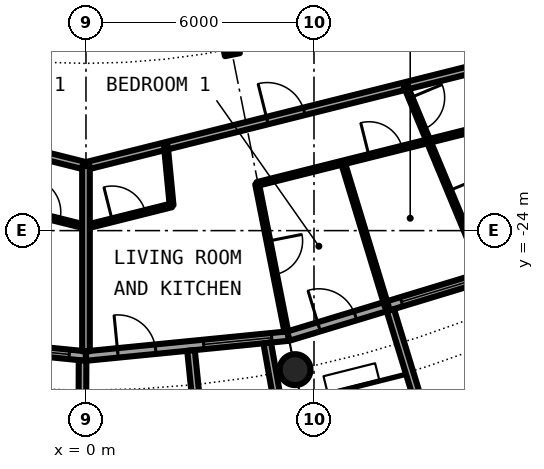
"""IFC4 building model, lengths in metres.
Left out: names, types, materials, properties, quantities, classifications, styles, units other than length and angle.
Written with IfcOpenShell. Run it as: python <this file> out.ifc"""

import sys

from ifc_helpers import new_model, si_unit, direction, frame, frame_2d, origin, origin_2d, place, context, subcontext, project, spatial, rectangle, circle, hollow_circle, i_section, extrude, element, fill, save


model = new_model("IFC4")
c1 = context("Model", 3, precision=1e-05, world=origin(), true_north=direction((0.0, 1.0)))
c2 = subcontext(c1, "Body", "Model", "MODEL_VIEW")
j1 = project(units=[si_unit("LENGTHUNIT", "METRE"), si_unit("PLANEANGLEUNIT", "RADIAN")], contexts=[c1])
p1 = place(None, origin())
s1 = spatial("IfcSite", under=j1, at=p1, CompositionType="ELEMENT")
p2 = place(p1, origin())
s2 = spatial("IfcBuilding", under=s1, at=p2, CompositionType="ELEMENT")
p3 = place(p2, frame((0.0, 0.0, 190.2)))
s3 = spatial("IfcBuildingStorey", under=s2, at=p3, CompositionType="ELEMENT", Elevation=190.2)
p4 = place(p3, frame((5.501, -27.658, 0.0), z_axis=(0.0, 0.0, 1.0), x_axis=(1.0, 0.0, 0.0)))
e1 = element("IfcColumn", 1, at=p4, inside=s3, PredefinedType="COLUMN", context=c2, shape_type="SweptSolid", body=[
    extrude(hollow_circle(Radius=0.406, WallThickness=0.03, at=origin_2d()), origin(), (0.0, 0.0, 1.0), 3.05),
])
p5 = place(p3, frame((3.824, -19.223, 0.0), z_axis=(0.0, 0.0, 1.0), x_axis=(0.195090322016, -0.980785280403, 0.0)))
e2 = element("IfcColumn", 2, at=p5, inside=s3, PredefinedType="COLUMN", context=c2, shape_type="SweptSolid", body=[
    extrude(i_section(OverallWidth=0.3, OverallDepth=0.4, WebThickness=0.013, FlangeThickness=0.024, FilletRadius=0.027, at=origin_2d()), origin(), (0.0, 0.0, 1.0), 3.05),
])
p6 = place(p3, frame((-5.326, -26.775, 0.0), z_axis=(0.0, 0.0, 1.0), x_axis=(0.995173996315, -0.098126026407, 0.0)))
e3 = element("IfcWall", 3, at=p6, inside=s3, PredefinedType="SOLIDWALL", context=c2, shape_type="SweptSolid", body=[
    extrude(rectangle(XDim=5.352, YDim=0.25, at=frame_2d((2.676, 0.0))), origin(), (0.0, 0.0, 1.0), 2.7),
])
p7 = place(p6, frame((0.841, 0.0, 0.0)))
e4 = element("IfcOpeningElement", 4, at=p7, cuts=e3, PredefinedType="OPENING", context=c2, shape_type="SweptSolid", body=[
    extrude(rectangle(XDim=1.0, YDim=2.2, at=frame_2d((0.5, 1.1))), frame((0.0, 0.135, 0.0), z_axis=(0.0, -1.0, 0.0), x_axis=(1.0, 0.0, 0.0)), (0.0, 0.0, 1.0), 0.27),
])
p8 = place(p6, frame((3.111, 0.0, 0.3)))
e5 = element("IfcOpeningElement", 5, at=p8, cuts=e3, PredefinedType="OPENING", context=c2, shape_type="SweptSolid", body=[
    extrude(rectangle(XDim=1.8, YDim=2.1, at=frame_2d((0.9, 1.05))), frame((0.0, 0.135, 0.0), z_axis=(0.0, -1.0, 0.0), x_axis=(1.0, 0.0, 0.0)), (0.0, 0.0, 1.0), 0.27),
])
p9 = place(p3, frame((-0.09, -27.417, -0.03), z_axis=(0.0, 0.0, 1.0), x_axis=(-0.00347308367, -0.999993968827, 0.0)))
e6 = element("IfcWall", 6, at=p9, inside=s3, PredefinedType="SOLIDWALL", context=c2, shape_type="SweptSolid", body=[
    extrude(rectangle(XDim=2.882, YDim=0.2, at=frame_2d((1.441, 0.0))), origin(), (0.0, 0.0, 1.0), 2.73),
])
p10 = place(p3, frame((0.0, -27.3, 0.0), z_axis=(0.0, 0.0, 1.0), x_axis=(0.995173996315, 0.098126026407, 0.0)))
e7 = element("IfcWall", 7, at=p10, inside=s3, PredefinedType="SOLIDWALL", context=c2, shape_type="SweptSolid", body=[
    extrude(rectangle(XDim=5.352, YDim=0.25, at=frame_2d((2.676, 0.0))), origin(), (0.0, 0.0, 1.0), 2.7),
])
p11 = place(p10, frame((0.841, 0.0, 0.0)))
e8 = element("IfcOpeningElement", 8, at=p11, cuts=e7, PredefinedType="OPENING", context=c2, shape_type="SweptSolid", body=[
    extrude(rectangle(XDim=1.0, YDim=2.2, at=frame_2d((0.5, 1.1))), frame((0.0, 0.135, 0.0), z_axis=(0.0, -1.0, 0.0), x_axis=(1.0, 0.0, 0.0)), (0.0, 0.0, 1.0), 0.27),
])
p12 = place(p10, frame((3.111, 0.0, 0.3)))
e9 = element("IfcOpeningElement", 9, at=p12, cuts=e7, PredefinedType="OPENING", context=c2, shape_type="SweptSolid", body=[
    extrude(rectangle(XDim=1.8, YDim=2.1, at=frame_2d((0.9, 1.05))), frame((0.0, 0.135, 0.0), z_axis=(0.0, -1.0, 0.0), x_axis=(1.0, 0.0, 0.0)), (0.0, 0.0, 1.0), 0.27),
])
p13 = place(p3, frame((2.764, -27.153, -0.03), z_axis=(0.0, 0.0, 1.0), x_axis=(0.101505487237, -0.994834979311, 0.0)))
e10 = element("IfcWall", 10, at=p13, inside=s3, PredefinedType="SOLIDWALL", context=c2, shape_type="SweptSolid", body=[
    extrude(rectangle(XDim=3.007, YDim=0.2, at=frame_2d((1.503, 0.0))), origin(), (0.0, 0.0, 1.0), 2.73),
])
p14 = place(p3, frame((4.769, -26.956, -0.03), z_axis=(0.0, 0.0, 1.0), x_axis=(0.174056778901, -0.984735618183, 0.0)))
e11 = element("IfcWall", 11, at=p14, inside=s3, PredefinedType="SOLIDWALL", context=c2, shape_type="SweptSolid", body=[
    extrude(rectangle(XDim=2.925, YDim=0.2, at=frame_2d((1.462, 0.0))), origin(), (0.0, 0.0, 1.0), 2.73),
])
p15 = place(p3, frame((5.326, -26.775, 0.0), z_axis=(0.0, 0.0, 1.0), x_axis=(0.956965678721, 0.290201119486, 0.0)))
e12 = element("IfcWall", 12, at=p15, inside=s3, PredefinedType="SOLIDWALL", context=c2, shape_type="SweptSolid", body=[
    extrude(rectangle(XDim=5.351, YDim=0.25, at=frame_2d((2.676, 0.0))), origin(), (0.0, 0.0, 1.0), 2.7),
])
p16 = place(p15, frame((0.841, 0.0, 0.0)))
e13 = element("IfcOpeningElement", 13, at=p16, cuts=e12, PredefinedType="OPENING", context=c2, shape_type="SweptSolid", body=[
    extrude(rectangle(XDim=1.0, YDim=2.2, at=frame_2d((0.5, 1.1))), frame((0.0, 0.135, 0.0), z_axis=(0.0, -1.0, 0.0), x_axis=(1.0, 0.0, 0.0)), (0.0, 0.0, 1.0), 0.27),
])
p17 = place(p15, frame((3.111, 0.0, 0.3)))
e14 = element("IfcOpeningElement", 14, at=p17, cuts=e12, PredefinedType="OPENING", context=c2, shape_type="SweptSolid", body=[
    extrude(rectangle(XDim=1.8, YDim=2.1, at=frame_2d((0.9, 1.05))), frame((0.0, 0.135, 0.0), z_axis=(0.0, -1.0, 0.0), x_axis=(1.0, 0.0, 0.0)), (0.0, 0.0, 1.0), 0.27),
])
p18 = place(p3, frame((8.82, -29.093, -0.03), z_axis=(0.0, 0.0, 1.0), x_axis=(0.941461077774, 0.337121697664, 0.0)))
e15 = element("IfcWall", 15, at=p18, inside=s3, PredefinedType="SOLIDWALL", context=c2, shape_type="SweptSolid", body=[
    extrude(rectangle(XDim=2.993, YDim=0.2, at=frame_2d((1.497, 0.0))), origin(), (0.0, 0.0, 1.0), 2.73),
])
p19 = place(p18, frame((0.457, 0.0, 0.33)))
e16 = element("IfcOpeningElement", 16, at=p19, cuts=e15, PredefinedType="OPENING", context=c2, shape_type="SweptSolid", body=[
    extrude(circle(Radius=1.04, at=frame_2d((1.04, 1.04))), frame((0.0, 0.11, 0.0), z_axis=(0.0, -1.0, 0.0), x_axis=(1.0, 0.0, 0.0)), (0.0, 0.0, 1.0), 0.22),
])
p20 = place(p3, frame((8.009, -26.092, -0.03), z_axis=(0.0, 0.0, 1.0), x_axis=(0.293406695073, -0.955987715029, 0.0)))
e17 = element("IfcWall", 17, at=p20, inside=s3, PredefinedType="SOLIDWALL", context=c2, shape_type="SweptSolid", body=[
    extrude(rectangle(XDim=3.006, YDim=0.2, at=frame_2d((1.503, 0.0))), origin(), (0.0, 0.0, 1.0), 2.73),
])
p21 = place(p3, frame((-2.253, -23.336, 0.0), z_axis=(0.0, 0.0, 1.0), x_axis=(0.970068250789, -0.242832429489, 0.0)))
e18 = element("IfcWall", 18, at=p21, inside=s3, PredefinedType="PARTITIONING", context=c2, shape_type="SweptSolid", body=[
    extrude(rectangle(XDim=2.323, YDim=0.1, at=frame_2d((1.161, 0.0))), origin(), (0.0, 0.0, 1.0), 2.7),
])
p22 = place(p21, frame((0.711, 0.0, 0.0)))
e19 = element("IfcOpeningElement", 19, at=p22, cuts=e18, PredefinedType="OPENING", context=c2, shape_type="SweptSolid", body=[
    extrude(rectangle(XDim=0.9, YDim=2.3, at=frame_2d((0.45, 1.15))), frame((0.0, 0.06, 0.0), z_axis=(0.0, -1.0, 0.0), x_axis=(1.0, 0.0, 0.0)), (0.0, 0.0, 1.0), 0.12),
])
p23 = place(p3, frame((0.0, -23.9, 0.0), z_axis=(0.0, 0.0, 1.0), x_axis=(0.970068250789, 0.242832429489, 0.0)))
e20 = element("IfcWall", 20, at=p23, inside=s3, PredefinedType="PARTITIONING", context=c2, shape_type="SweptSolid", body=[
    extrude(rectangle(XDim=2.323, YDim=0.1, at=frame_2d((1.161, 0.0))), origin(), (0.0, 0.0, 1.0), 2.7),
])
p24 = place(p23, frame((0.711, 0.0, 0.0)))
e21 = element("IfcOpeningElement", 21, at=p24, cuts=e20, PredefinedType="OPENING", context=c2, shape_type="SweptSolid", body=[
    extrude(rectangle(XDim=0.9, YDim=2.3, at=frame_2d((0.45, 1.15))), frame((0.0, 0.06, 0.0), z_axis=(0.0, -1.0, 0.0), x_axis=(1.0, 0.0, 0.0)), (0.0, 0.0, 1.0), 0.12),
])
p25 = place(p3, frame((4.502, -22.773, 0.0), z_axis=(0.0, 0.0, 1.0), x_axis=(0.970080680347, 0.24278277043, 0.0)))
e22 = element("IfcWall", 22, at=p25, inside=s3, PredefinedType="PARTITIONING", context=c2, shape_type="SweptSolid", body=[
    extrude(rectangle(XDim=6.973, YDim=0.1, at=frame_2d((3.486, 0.0))), origin(), (0.0, 0.0, 1.0), 2.7),
])
p26 = place(p25, frame((3.037, 0.0, 0.0)))
e23 = element("IfcOpeningElement", 23, at=p26, cuts=e22, PredefinedType="OPENING", context=c2, shape_type="SweptSolid", body=[
    extrude(rectangle(XDim=0.9, YDim=2.3, at=frame_2d((0.45, 1.15))), frame((0.0, 0.06, 0.0), z_axis=(0.0, -1.0, 0.0), x_axis=(1.0, 0.0, 0.0)), (0.0, 0.0, 1.0), 0.12),
])
p27 = place(p3, frame((-10.517, -19.665, 0.0), z_axis=(0.0, 0.0, 1.0), x_axis=(0.970023226325, -0.243012222716, 0.0)))
e24 = element("IfcWall", 24, at=p27, inside=s3, PredefinedType="PARTITIONING", context=c2, shape_type="SweptSolid", body=[
    extrude(rectangle(XDim=10.847, YDim=0.2, at=frame_2d((5.424, 0.0))), origin(), (0.0, 0.0, 1.0), 2.7),
])
p28 = place(p27, frame((4.924, 0.0, 0.0)))
e25 = element("IfcOpeningElement", 25, at=p28, cuts=e24, PredefinedType="OPENING", context=c2, shape_type="SweptSolid", body=[
    extrude(rectangle(XDim=1.0, YDim=2.3, at=frame_2d((0.5, 1.15))), frame((0.0, 0.11, 0.0), z_axis=(0.0, -1.0, 0.0), x_axis=(1.0, 0.0, 0.0)), (0.0, 0.0, 1.0), 0.22),
])
p29 = place(p3, frame((-0.005, -22.301, 0.0), z_axis=(0.0, 0.0, 1.0), x_axis=(0.970023226325, 0.243012222716, 0.0)))
e26 = element("IfcWall", 26, at=p29, inside=s3, PredefinedType="PARTITIONING", context=c2, shape_type="SweptSolid", body=[
    extrude(rectangle(XDim=10.847, YDim=0.2, at=frame_2d((5.424, 0.0))), origin(), (0.0, 0.0, 1.0), 2.7),
])
p30 = place(p29, frame((4.924, 0.0, 0.0)))
e27 = element("IfcOpeningElement", 27, at=p30, cuts=e26, PredefinedType="OPENING", context=c2, shape_type="SweptSolid", body=[
    extrude(rectangle(XDim=1.0, YDim=2.3, at=frame_2d((0.5, 1.15))), frame((0.0, 0.11, 0.0), z_axis=(0.0, -1.0, 0.0), x_axis=(1.0, 0.0, 0.0)), (0.0, 0.0, 1.0), 0.22),
])
p31 = place(p3, frame((0.0, -27.175, 0.0), z_axis=(0.0, 0.0, 1.0), x_axis=(0.0, 1.0, 0.0)))
e28 = element("IfcWall", 28, at=p31, inside=s3, PredefinedType="PARTITIONING", context=c2, shape_type="SweptSolid", body=[
    extrude(rectangle(XDim=4.875, YDim=0.2, at=frame_2d((2.438, 0.0))), origin(), (0.0, 0.0, 1.0), 2.7),
])
p32 = place(p3, frame((2.102, -21.773, 0.0), z_axis=(0.0, 0.0, 1.0), x_axis=(0.09608568494, -0.995373066317, 0.0)))
e29 = element("IfcWall", 29, at=p32, inside=s3, PredefinedType="PARTITIONING", context=c2, shape_type="SweptSolid", body=[
    extrude(rectangle(XDim=1.57, YDim=0.1, at=frame_2d((0.785, 0.0))), origin(), (0.0, 0.0, 1.0), 2.7),
])
p33 = place(p3, frame((4.503, -22.772, 0.0), z_axis=(0.0, 0.0, 1.0), x_axis=(0.194089507313, -0.980983824103, 0.0)))
e30 = element("IfcWall", 30, at=p33, inside=s3, PredefinedType="PARTITIONING", context=c2, shape_type="SweptSolid", body=[
    extrude(rectangle(XDim=3.962, YDim=0.1, at=frame_2d((1.981, 0.0))), origin(), (0.0, 0.0, 1.0), 2.7),
])
p34 = place(p33, frame((1.531, 0.0, 0.0)))
e31 = element("IfcOpeningElement", 31, at=p34, cuts=e30, PredefinedType="OPENING", context=c2, shape_type="SweptSolid", body=[
    extrude(rectangle(XDim=0.9, YDim=2.3, at=frame_2d((0.45, 1.15))), frame((0.0, 0.06, 0.0), z_axis=(0.0, -1.0, 0.0), x_axis=(1.0, 0.0, 0.0)), (0.0, 0.0, 1.0), 0.12),
])
p35 = place(p3, frame((6.76, -22.207, 0.0), z_axis=(0.0, 0.0, 1.0), x_axis=(0.291291575636, -0.956634317785, 0.0)))
e32 = element("IfcWall", 32, at=p35, inside=s3, PredefinedType="PARTITIONING", context=c2, shape_type="SweptSolid", body=[
    extrude(rectangle(XDim=3.962, YDim=0.1, at=frame_2d((1.981, 0.0))), origin(), (0.0, 0.0, 1.0), 2.7),
])
p36 = place(p3, frame((8.41, -20.193, 0.0), z_axis=(0.0, 0.0, 1.0), x_axis=(0.384363513821, -0.923181828917, 0.0)))
e33 = element("IfcWall", 33, at=p36, inside=s3, PredefinedType="PARTITIONING", context=c2, shape_type="SweptSolid", body=[
    extrude(rectangle(XDim=5.3, YDim=0.1, at=frame_2d((2.65, 0.0))), origin(), (0.0, 0.0, 1.0), 2.7),
])
p37 = place(p36, frame((0.335, 0.0, 0.0)))
e34 = element("IfcOpeningElement", 34, at=p37, cuts=e33, PredefinedType="OPENING", context=c2, shape_type="SweptSolid", body=[
    extrude(rectangle(XDim=0.9, YDim=2.3, at=frame_2d((0.45, 1.15))), frame((0.0, 0.06, 0.0), z_axis=(0.0, -1.0, 0.0), x_axis=(1.0, 0.0, 0.0)), (0.0, 0.0, 1.0), 0.12),
])
p38 = place(p36, frame((2.985, 0.0, 0.0)))
e35 = element("IfcOpeningElement", 35, at=p38, cuts=e33, PredefinedType="OPENING", context=c2, shape_type="SweptSolid", body=[
    extrude(rectangle(XDim=0.9, YDim=2.3, at=frame_2d((0.45, 1.15))), frame((0.0, 0.06, 0.0), z_axis=(0.0, -1.0, 0.0), x_axis=(1.0, 0.0, 0.0)), (0.0, 0.0, 1.0), 0.12),
])
p39 = place(p8, origin())
e36 = element("IfcWindow", 36, at=p39, inside=s3, PartitioningType="SINGLE_PANEL", PredefinedType="WINDOW", context=c2, shape_type="SweptSolid", body=[
    extrude(rectangle(XDim=1.8, YDim=2.1, at=frame_2d((0.9, 1.05))), frame((0.0, 0.03, 0.0), z_axis=(0.0, -1.0, 0.0), x_axis=(1.0, 0.0, 0.0)), (0.0, 0.0, 1.0), 0.06),
])
fill(e5, e36)
p40 = place(p11, origin())
e37 = element("IfcDoor", 37, at=p40, inside=s3, OperationType="SINGLE_SWING_LEFT", PredefinedType="DOOR", context=c2, shape_type="SweptSolid", body=[
    extrude(rectangle(XDim=1.0, YDim=2.2, at=frame_2d((0.5, 1.1))), frame((0.0, 0.025, 0.0), z_axis=(0.0, -1.0, 0.0), x_axis=(1.0, 0.0, 0.0)), (0.0, 0.0, 1.0), 0.05),
])
fill(e8, e37)
p41 = place(p12, origin())
e38 = element("IfcWindow", 38, at=p41, inside=s3, PartitioningType="SINGLE_PANEL", PredefinedType="WINDOW", context=c2, shape_type="SweptSolid", body=[
    extrude(rectangle(XDim=1.8, YDim=2.1, at=frame_2d((0.9, 1.05))), frame((0.0, 0.03, 0.0), z_axis=(0.0, -1.0, 0.0), x_axis=(1.0, 0.0, 0.0)), (0.0, 0.0, 1.0), 0.06),
])
fill(e9, e38)
p42 = place(p16, origin())
e39 = element("IfcDoor", 39, at=p42, inside=s3, OperationType="SINGLE_SWING_LEFT", PredefinedType="DOOR", context=c2, shape_type="SweptSolid", body=[
    extrude(rectangle(XDim=1.0, YDim=2.2, at=frame_2d((0.5, 1.1))), frame((0.0, 0.025, 0.0), z_axis=(0.0, -1.0, 0.0), x_axis=(1.0, 0.0, 0.0)), (0.0, 0.0, 1.0), 0.05),
])
fill(e13, e39)
p43 = place(p17, origin())
e40 = element("IfcWindow", 40, at=p43, inside=s3, PartitioningType="SINGLE_PANEL", PredefinedType="WINDOW", context=c2, shape_type="SweptSolid", body=[
    extrude(rectangle(XDim=1.8, YDim=2.1, at=frame_2d((0.9, 1.05))), frame((0.0, 0.03, 0.0), z_axis=(0.0, -1.0, 0.0), x_axis=(1.0, 0.0, 0.0)), (0.0, 0.0, 1.0), 0.06),
])
fill(e14, e40)
p44 = place(p22, origin())
e41 = element("IfcDoor", 41, at=p44, inside=s3, OperationType="SINGLE_SWING_RIGHT", PredefinedType="DOOR", context=c2, shape_type="SweptSolid", body=[
    extrude(rectangle(XDim=0.9, YDim=2.3, at=frame_2d((0.45, 1.15))), frame((0.0, 0.025, 0.0), z_axis=(0.0, -1.0, 0.0), x_axis=(1.0, 0.0, 0.0)), (0.0, 0.0, 1.0), 0.05),
])
fill(e19, e41)
p45 = place(p30, origin())
e42 = element("IfcDoor", 42, at=p45, inside=s3, OperationType="SINGLE_SWING_RIGHT", PredefinedType="DOOR", context=c2, shape_type="SweptSolid", body=[
    extrude(rectangle(XDim=1.0, YDim=2.3, at=frame_2d((0.5, 1.15))), frame((0.0, 0.025, 0.0), z_axis=(0.0, -1.0, 0.0), x_axis=(1.0, 0.0, 0.0)), (0.0, 0.0, 1.0), 0.05),
])
fill(e27, e42)
p46 = place(p24, origin())
e43 = element("IfcDoor", 43, at=p46, inside=s3, OperationType="SINGLE_SWING_LEFT", PredefinedType="DOOR", context=c2, shape_type="SweptSolid", body=[
    extrude(rectangle(XDim=0.9, YDim=2.3, at=frame_2d((0.45, 1.15))), frame((0.0, 0.025, 0.0), z_axis=(0.0, -1.0, 0.0), x_axis=(1.0, 0.0, 0.0)), (0.0, 0.0, 1.0), 0.05),
])
fill(e21, e43)
p47 = place(p37, origin())
e44 = element("IfcDoor", 44, at=p47, inside=s3, OperationType="SINGLE_SWING_LEFT", PredefinedType="DOOR", context=c2, shape_type="SweptSolid", body=[
    extrude(rectangle(XDim=0.9, YDim=2.3, at=frame_2d((0.45, 1.15))), frame((0.0, 0.025, 0.0), z_axis=(0.0, -1.0, 0.0), x_axis=(1.0, 0.0, 0.0)), (0.0, 0.0, 1.0), 0.05),
])
fill(e34, e44)
p48 = place(p34, origin())
e45 = element("IfcDoor", 45, at=p48, inside=s3, OperationType="SINGLE_SWING_LEFT", PredefinedType="DOOR", context=c2, shape_type="SweptSolid", body=[
    extrude(rectangle(XDim=0.9, YDim=2.3, at=frame_2d((0.45, 1.15))), frame((0.0, 0.025, 0.0), z_axis=(0.0, -1.0, 0.0), x_axis=(1.0, 0.0, 0.0)), (0.0, 0.0, 1.0), 0.05),
])
fill(e31, e45)
p49 = place(p26, origin())
e46 = element("IfcDoor", 46, at=p49, inside=s3, OperationType="SINGLE_SWING_RIGHT", PredefinedType="DOOR", context=c2, shape_type="SweptSolid", body=[
    extrude(rectangle(XDim=0.9, YDim=2.3, at=frame_2d((0.45, 1.15))), frame((0.0, 0.025, 0.0), z_axis=(0.0, -1.0, 0.0), x_axis=(1.0, 0.0, 0.0)), (0.0, 0.0, 1.0), 0.05),
])
fill(e23, e46)
p50 = place(p38, origin())
e47 = element("IfcDoor", 47, at=p50, inside=s3, OperationType="SINGLE_SWING_RIGHT", PredefinedType="DOOR", context=c2, shape_type="SweptSolid", body=[
    extrude(rectangle(XDim=0.9, YDim=2.3, at=frame_2d((0.45, 1.15))), frame((0.0, 0.025, 0.0), z_axis=(0.0, -1.0, 0.0), x_axis=(1.0, 0.0, 0.0)), (0.0, 0.0, 1.0), 0.05),
])
fill(e35, e47)
save(model, sys.argv[1])
